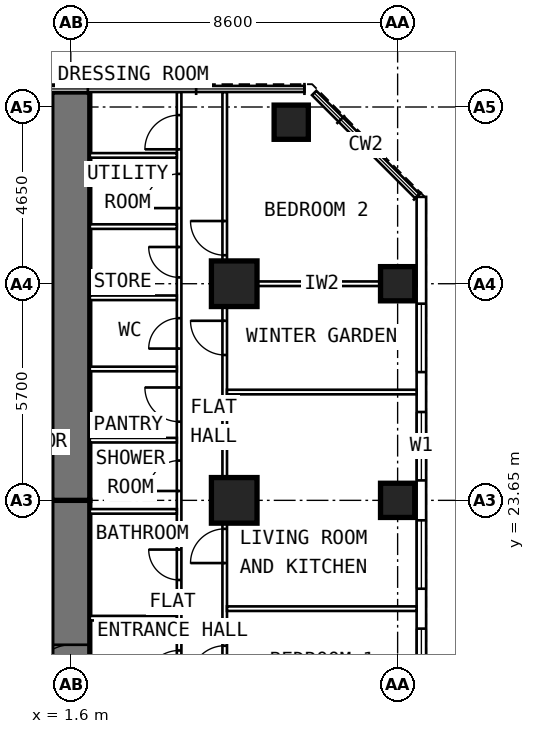
"""IFC4 building model, lengths in metres.
Left out: names, types, materials, properties, quantities, classifications, styles, units other than length and angle.
Written with IfcOpenShell. Run it as: python <this file> out.ifc"""

import sys

from ifc_helpers import new_model, si_unit, direction, frame, frame_2d, origin, origin_2d, place, context, subcontext, project, spatial, rectangle, extrude, element, fill, save


model = new_model("IFC4")
c1 = context("Model", 3, precision=1e-05, world=origin(), true_north=direction((0.0, 1.0)))
c2 = subcontext(c1, "Body", "Model", "MODEL_VIEW")
j1 = project(units=[si_unit("LENGTHUNIT", "METRE"), si_unit("PLANEANGLEUNIT", "RADIAN")], contexts=[c1])
p1 = place(None, origin())
s1 = spatial("IfcSite", under=j1, at=p1, CompositionType="ELEMENT")
p2 = place(p1, origin())
s2 = spatial("IfcBuilding", under=s1, at=p2, CompositionType="ELEMENT")
p3 = place(p2, frame((0.0, 0.0, 91.6)))
s3 = spatial("IfcBuildingStorey", under=s2, at=p3, CompositionType="ELEMENT", Elevation=91.6)
for number, where, z_axis, x_axis in (
    (1, (10.2, 23.65, 0.0), (0.0, 0.0, 1.0), (0.0, 1.0, 0.0)),
    (2, (10.2, 29.35, 0.0), (0.0, 0.0, 1.0), (0.0, 1.0, 0.0)),
    (3, (7.4, 33.6, 0.0), (0.0, 0.0, 1.0), (0.0, 1.0, 0.0)),
):
    element("IfcColumn", number, at=place(p3, frame(where, z_axis=z_axis, x_axis=x_axis)), inside=s3, PredefinedType="COLUMN", context=c2, shape_type="SweptSolid", body=[
        extrude(rectangle(XDim=0.9, YDim=0.9, at=origin_2d()), origin(), (0.0, 0.0, 1.0), 3.6),
    ])
for number, where, z_axis, x_axis in (
    (4, (5.9, 23.65, 0.0), (0.0, 0.0, 1.0), (0.0, 1.0, 0.0)),
    (5, (5.9, 29.35, 0.0), (0.0, 0.0, 1.0), (0.0, 1.0, 0.0)),
):
    element("IfcColumn", number, at=place(p3, frame(where, z_axis=z_axis, x_axis=x_axis)), inside=s3, PredefinedType="COLUMN", context=c2, shape_type="SweptSolid", body=[
        extrude(rectangle(XDim=1.2, YDim=1.2, at=origin_2d()), origin(), (0.0, 0.0, 1.0), 3.6),
    ])
p4 = place(p3, frame((1.6, 17.95, 0.0), z_axis=(0.0, 0.0, 1.0), x_axis=(0.0, 1.0, 0.0)))
e6 = element("IfcWall", 6, at=p4, inside=s3, PredefinedType="SHEAR", context=c2, shape_type="SweptSolid", body=[
    extrude(rectangle(XDim=5.7, YDim=1.0, at=frame_2d((2.85, 0.0))), origin(), (0.0, 0.0, 1.0), 3.6),
])
p5 = place(p4, frame((0.9, 0.0, 0.0)))
e7 = element("IfcOpeningElement", 7, at=p5, cuts=e6, PredefinedType="OPENING", context=c2, shape_type="SweptSolid", body=[
    extrude(rectangle(XDim=1.0, YDim=2.1, at=frame_2d((0.5, 1.05))), frame((0.0, 0.512, 0.0), z_axis=(0.0, -1.0, 0.0), x_axis=(1.0, 0.0, 0.0)), (0.0, 0.0, 1.0), 1.024),
])
p6 = place(p3, frame((1.6, 23.65, 0.0), z_axis=(0.0, 0.0, 1.0), x_axis=(0.0, 1.0, 0.0)))
e8 = element("IfcWall", 8, at=p6, inside=s3, PredefinedType="SHEAR", context=c2, shape_type="SweptSolid", body=[
    extrude(rectangle(XDim=10.745, YDim=1.0, at=frame_2d((5.373, 0.0))), origin(), (0.0, 0.0, 1.0), 3.6),
])
p7 = place(p3, frame((10.825, 6.409, 0.0), z_axis=(0.0, 0.0, 1.0), x_axis=(0.0, 1.0, 0.0)))
e9 = element("IfcWall", 9, at=p7, inside=s3, PredefinedType="SOLIDWALL", context=c2, shape_type="SweptSolid", body=[
    extrude(rectangle(XDim=25.226, YDim=0.25, at=frame_2d((12.613, 0.0))), origin(), (0.0, 0.0, 1.0), 3.35),
])
p8 = place(p7, frame((0.666, 0.0, 0.8)))
e10 = element("IfcOpeningElement", 10, at=p8, cuts=e9, PredefinedType="OPENING", context=c2, shape_type="SweptSolid", body=[
    extrude(rectangle(XDim=1.8, YDim=1.8, at=frame_2d((0.9, 0.9))), frame((0.0, 0.137, 0.0), z_axis=(0.0, -1.0, 0.0), x_axis=(1.0, 0.0, 0.0)), (0.0, 0.0, 1.0), 0.274),
])
p9 = place(p7, frame((3.516, 0.0, 0.8)))
e11 = element("IfcOpeningElement", 11, at=p9, cuts=e9, PredefinedType="OPENING", context=c2, shape_type="SweptSolid", body=[
    extrude(rectangle(XDim=1.8, YDim=1.8, at=frame_2d((0.9, 0.9))), frame((0.0, 0.137, 0.0), z_axis=(0.0, -1.0, 0.0), x_axis=(1.0, 0.0, 0.0)), (0.0, 0.0, 1.0), 0.274),
])
p10 = place(p7, frame((6.366, 0.0, 0.8)))
e12 = element("IfcOpeningElement", 12, at=p10, cuts=e9, PredefinedType="OPENING", context=c2, shape_type="SweptSolid", body=[
    extrude(rectangle(XDim=1.8, YDim=1.8, at=frame_2d((0.9, 0.9))), frame((0.0, 0.137, 0.0), z_axis=(0.0, -1.0, 0.0), x_axis=(1.0, 0.0, 0.0)), (0.0, 0.0, 1.0), 0.274),
])
p11 = place(p7, frame((9.216, 0.0, 0.8)))
e13 = element("IfcOpeningElement", 13, at=p11, cuts=e9, PredefinedType="OPENING", context=c2, shape_type="SweptSolid", body=[
    extrude(rectangle(XDim=1.8, YDim=1.8, at=frame_2d((0.9, 0.9))), frame((0.0, 0.137, 0.0), z_axis=(0.0, -1.0, 0.0), x_axis=(1.0, 0.0, 0.0)), (0.0, 0.0, 1.0), 0.274),
])
p12 = place(p7, frame((12.066, 0.0, 0.8)))
e14 = element("IfcOpeningElement", 14, at=p12, cuts=e9, PredefinedType="OPENING", context=c2, shape_type="SweptSolid", body=[
    extrude(rectangle(XDim=1.8, YDim=1.8, at=frame_2d((0.9, 0.9))), frame((0.0, 0.137, 0.0), z_axis=(0.0, -1.0, 0.0), x_axis=(1.0, 0.0, 0.0)), (0.0, 0.0, 1.0), 0.274),
])
p13 = place(p7, frame((14.916, 0.0, 0.8)))
e15 = element("IfcOpeningElement", 15, at=p13, cuts=e9, PredefinedType="OPENING", context=c2, shape_type="SweptSolid", body=[
    extrude(rectangle(XDim=1.8, YDim=1.8, at=frame_2d((0.9, 0.9))), frame((0.0, 0.137, 0.0), z_axis=(0.0, -1.0, 0.0), x_axis=(1.0, 0.0, 0.0)), (0.0, 0.0, 1.0), 0.274),
])
p14 = place(p7, frame((17.766, 0.0, 0.8)))
e16 = element("IfcOpeningElement", 16, at=p14, cuts=e9, PredefinedType="OPENING", context=c2, shape_type="SweptSolid", body=[
    extrude(rectangle(XDim=1.8, YDim=1.8, at=frame_2d((0.9, 0.9))), frame((0.0, 0.137, 0.0), z_axis=(0.0, -1.0, 0.0), x_axis=(1.0, 0.0, 0.0)), (0.0, 0.0, 1.0), 0.274),
])
p15 = place(p7, frame((20.616, 0.0, 0.8)))
e17 = element("IfcOpeningElement", 17, at=p15, cuts=e9, PredefinedType="OPENING", context=c2, shape_type="SweptSolid", body=[
    extrude(rectangle(XDim=1.8, YDim=1.8, at=frame_2d((0.9, 0.9))), frame((0.0, 0.137, 0.0), z_axis=(0.0, -1.0, 0.0), x_axis=(1.0, 0.0, 0.0)), (0.0, 0.0, 1.0), 0.274),
])
p16 = place(p3, frame((4.45, 18.05, 0.0), z_axis=(0.0, 0.0, 1.0), x_axis=(0.0, 1.0, 0.0)))
e18 = element("IfcWall", 18, at=p16, inside=s3, PredefinedType="PARTITIONING", context=c2, shape_type="SweptSolid", body=[
    extrude(rectangle(XDim=16.345, YDim=0.12, at=frame_2d((8.172, 0.0))), origin(), (0.0, 0.0, 1.0), 3.35),
])
p17 = place(p16, frame((0.75, 0.0, 0.0)))
e19 = element("IfcOpeningElement", 19, at=p17, cuts=e18, PredefinedType="OPENING", context=c2, shape_type="SweptSolid", body=[
    extrude(rectangle(XDim=0.9, YDim=2.1, at=frame_2d((0.45, 1.05))), frame((0.0, 0.072, 0.0), z_axis=(0.0, -1.0, 0.0), x_axis=(1.0, 0.0, 0.0)), (0.0, 0.0, 1.0), 0.144),
])
p18 = place(p16, frame((3.505, 0.0, 0.0)))
e20 = element("IfcOpeningElement", 20, at=p18, cuts=e18, PredefinedType="OPENING", context=c2, shape_type="SweptSolid", body=[
    extrude(rectangle(XDim=0.8, YDim=2.1, at=frame_2d((0.4, 1.05))), frame((0.0, 0.072, 0.0), z_axis=(0.0, -1.0, 0.0), x_axis=(1.0, 0.0, 0.0)), (0.0, 0.0, 1.0), 0.144),
])
p19 = place(p16, frame((5.847, 0.0, 0.0)))
e21 = element("IfcOpeningElement", 21, at=p19, cuts=e18, PredefinedType="OPENING", context=c2, shape_type="SweptSolid", body=[
    extrude(rectangle(XDim=0.8, YDim=2.1, at=frame_2d((0.4, 1.05))), frame((0.0, 0.072, 0.0), z_axis=(0.0, -1.0, 0.0), x_axis=(1.0, 0.0, 0.0)), (0.0, 0.0, 1.0), 0.144),
])
p20 = place(p16, frame((7.67, 0.0, 0.0)))
e22 = element("IfcOpeningElement", 22, at=p20, cuts=e18, PredefinedType="OPENING", context=c2, shape_type="SweptSolid", body=[
    extrude(rectangle(XDim=0.9, YDim=2.1, at=frame_2d((0.45, 1.05))), frame((0.0, 0.072, 0.0), z_axis=(0.0, -1.0, 0.0), x_axis=(1.0, 0.0, 0.0)), (0.0, 0.0, 1.0), 0.144),
])
p21 = place(p16, frame((9.593, 0.0, 0.0)))
e23 = element("IfcOpeningElement", 23, at=p21, cuts=e18, PredefinedType="OPENING", context=c2, shape_type="SweptSolid", body=[
    extrude(rectangle(XDim=0.8, YDim=2.1, at=frame_2d((0.4, 1.05))), frame((0.0, 0.072, 0.0), z_axis=(0.0, -1.0, 0.0), x_axis=(1.0, 0.0, 0.0)), (0.0, 0.0, 1.0), 0.144),
])
p22 = place(p16, frame((11.467, 0.0, 0.0)))
e24 = element("IfcOpeningElement", 24, at=p22, cuts=e18, PredefinedType="OPENING", context=c2, shape_type="SweptSolid", body=[
    extrude(rectangle(XDim=0.8, YDim=2.1, at=frame_2d((0.4, 1.05))), frame((0.0, 0.072, 0.0), z_axis=(0.0, -1.0, 0.0), x_axis=(1.0, 0.0, 0.0)), (0.0, 0.0, 1.0), 0.144),
])
p23 = place(p16, frame((13.29, 0.0, 0.0)))
e25 = element("IfcOpeningElement", 25, at=p23, cuts=e18, PredefinedType="OPENING", context=c2, shape_type="SweptSolid", body=[
    extrude(rectangle(XDim=0.9, YDim=2.1, at=frame_2d((0.45, 1.05))), frame((0.0, 0.072, 0.0), z_axis=(0.0, -1.0, 0.0), x_axis=(1.0, 0.0, 0.0)), (0.0, 0.0, 1.0), 0.144),
])
p24 = place(p16, frame((14.837, 0.0, 0.0)))
e26 = element("IfcOpeningElement", 26, at=p24, cuts=e18, PredefinedType="OPENING", context=c2, shape_type="SweptSolid", body=[
    extrude(rectangle(XDim=0.9, YDim=2.1, at=frame_2d((0.45, 1.05))), frame((0.0, 0.072, 0.0), z_axis=(0.0, -1.0, 0.0), x_axis=(1.0, 0.0, 0.0)), (0.0, 0.0, 1.0), 0.144),
])
p25 = place(p3, frame((5.65, 18.05, 0.0), z_axis=(0.0, 0.0, 1.0), x_axis=(0.0, 1.0, 0.0)))
e27 = element("IfcWall", 27, at=p25, inside=s3, PredefinedType="PARTITIONING", context=c2, shape_type="SweptSolid", body=[
    extrude(rectangle(XDim=16.345, YDim=0.12, at=frame_2d((8.172, 0.0))), origin(), (0.0, 0.0, 1.0), 3.35),
])
p26 = place(p25, frame((0.875, 0.0, 0.0)))
e28 = element("IfcOpeningElement", 28, at=p26, cuts=e27, PredefinedType="OPENING", context=c2, shape_type="SweptSolid", body=[
    extrude(rectangle(XDim=0.9, YDim=2.1, at=frame_2d((0.45, 1.05))), frame((0.0, 0.072, 0.0), z_axis=(0.0, -1.0, 0.0), x_axis=(1.0, 0.0, 0.0)), (0.0, 0.0, 1.0), 0.144),
])
p27 = place(p25, frame((3.95, 0.0, 0.0)))
e29 = element("IfcOpeningElement", 29, at=p27, cuts=e27, PredefinedType="OPENING", context=c2, shape_type="SweptSolid", body=[
    extrude(rectangle(XDim=0.9, YDim=2.1, at=frame_2d((0.45, 1.05))), frame((0.0, 0.072, 0.0), z_axis=(0.0, -1.0, 0.0), x_axis=(1.0, 0.0, 0.0)), (0.0, 0.0, 1.0), 0.144),
])
p28 = place(p25, frame((9.425, 0.0, 0.0)))
e30 = element("IfcOpeningElement", 30, at=p28, cuts=e27, PredefinedType="OPENING", context=c2, shape_type="SweptSolid", body=[
    extrude(rectangle(XDim=0.9, YDim=2.1, at=frame_2d((0.45, 1.05))), frame((0.0, 0.072, 0.0), z_axis=(0.0, -1.0, 0.0), x_axis=(1.0, 0.0, 0.0)), (0.0, 0.0, 1.0), 0.144),
])
p29 = place(p25, frame((12.05, 0.0, 0.0)))
e31 = element("IfcOpeningElement", 31, at=p29, cuts=e27, PredefinedType="OPENING", context=c2, shape_type="SweptSolid", body=[
    extrude(rectangle(XDim=0.9, YDim=2.1, at=frame_2d((0.45, 1.05))), frame((0.0, 0.072, 0.0), z_axis=(0.0, -1.0, 0.0), x_axis=(1.0, 0.0, 0.0)), (0.0, 0.0, 1.0), 0.144),
])
for number, where, z_axis, x_axis in (
    (32, (5.71, 20.8, 0.0), (0.0, 0.0, 1.0), (1.0, 0.0, 0.0)),
    (33, (5.71, 26.5, 0.0), (0.0, 0.0, 1.0), (1.0, 0.0, 0.0)),
):
    element("IfcWall", number, at=place(p3, frame(where, z_axis=z_axis, x_axis=x_axis)), inside=s3, PredefinedType="PARTITIONING", context=c2, shape_type="SweptSolid", body=[
        extrude(rectangle(XDim=4.99, YDim=0.12, at=frame_2d((2.495, 0.0))), origin(), (0.0, 0.0, 1.0), 3.35),
    ])
p30 = place(p3, frame((5.71, 29.35, 0.0), z_axis=(0.0, 0.0, 1.0), x_axis=(1.0, 0.0, 0.0)))
e34 = element("IfcWall", 34, at=p30, inside=s3, PredefinedType="PARTITIONING", context=c2, shape_type="SweptSolid", body=[
    extrude(rectangle(XDim=4.99, YDim=0.12, at=frame_2d((2.495, 0.0))), origin(), (0.0, 0.0, 1.0), 2.45),
])
p31 = place(p3, frame((2.1, 20.55, 0.0), z_axis=(0.0, 0.0, 1.0), x_axis=(1.0, 0.0, 0.0)))
e35 = element("IfcWall", 35, at=p31, inside=s3, PredefinedType="PARTITIONING", context=c2, shape_type="SweptSolid", body=[
    extrude(rectangle(XDim=2.29, YDim=0.12, at=frame_2d((1.145, 0.0))), origin(), (0.0, 0.0, 1.0), 3.35),
])
p32 = place(p3, frame((2.1, 23.36, 0.0), z_axis=(0.0, 0.0, 1.0), x_axis=(1.0, 0.0, 0.0)))
e36 = element("IfcWall", 36, at=p32, inside=s3, PredefinedType="PARTITIONING", context=c2, shape_type="SweptSolid", body=[
    extrude(rectangle(XDim=2.29, YDim=0.12, at=frame_2d((1.145, 0.0))), origin(), (0.0, 0.0, 1.0), 2.45),
])
for number, where, z_axis, x_axis in (
    (37, (2.1, 25.233, 0.0), (0.0, 0.0, 1.0), (1.0, 0.0, 0.0)),
    (38, (2.1, 27.107, 0.0), (0.0, 0.0, 1.0), (1.0, 0.0, 0.0)),
):
    element("IfcWall", number, at=place(p3, frame(where, z_axis=z_axis, x_axis=x_axis)), inside=s3, PredefinedType="PARTITIONING", context=c2, shape_type="SweptSolid", body=[
        extrude(rectangle(XDim=2.29, YDim=0.12, at=frame_2d((1.145, 0.0))), origin(), (0.0, 0.0, 1.0), 3.35),
    ])
p33 = place(p3, frame((2.1, 28.98, 0.0), z_axis=(0.0, 0.0, 1.0), x_axis=(1.0, 0.0, 0.0)))
e39 = element("IfcWall", 39, at=p33, inside=s3, PredefinedType="PARTITIONING", context=c2, shape_type="SweptSolid", body=[
    extrude(rectangle(XDim=2.29, YDim=0.12, at=frame_2d((1.145, 0.0))), origin(), (0.0, 0.0, 1.0), 2.45),
])
for number, where, z_axis, x_axis in (
    (40, (2.1, 30.853, 0.0), (0.0, 0.0, 1.0), (1.0, 0.0, 0.0)),
    (41, (2.1, 32.727, 0.0), (0.0, 0.0, 1.0), (1.0, 0.0, 0.0)),
):
    element("IfcWall", number, at=place(p3, frame(where, z_axis=z_axis, x_axis=x_axis)), inside=s3, PredefinedType="PARTITIONING", context=c2, shape_type="SweptSolid", body=[
        extrude(rectangle(XDim=2.29, YDim=0.12, at=frame_2d((1.145, 0.0))), origin(), (0.0, 0.0, 1.0), 3.35),
    ])
p34 = place(p12, origin())
e42 = element("IfcWindow", 42, at=p34, inside=s3, PartitioningType="SINGLE_PANEL", PredefinedType="WINDOW", context=c2, shape_type="SweptSolid", body=[
    extrude(rectangle(XDim=1.8, YDim=1.8, at=frame_2d((0.9, 0.9))), frame((0.0, 0.03, 0.0), z_axis=(0.0, -1.0, 0.0), x_axis=(1.0, 0.0, 0.0)), (0.0, 0.0, 1.0), 0.06),
])
fill(e14, e42)
p35 = place(p13, origin())
e43 = element("IfcWindow", 43, at=p35, inside=s3, PartitioningType="SINGLE_PANEL", PredefinedType="WINDOW", context=c2, shape_type="SweptSolid", body=[
    extrude(rectangle(XDim=1.8, YDim=1.8, at=frame_2d((0.9, 0.9))), frame((0.0, 0.03, 0.0), z_axis=(0.0, -1.0, 0.0), x_axis=(1.0, 0.0, 0.0)), (0.0, 0.0, 1.0), 0.06),
])
fill(e15, e43)
p36 = place(p14, origin())
e44 = element("IfcWindow", 44, at=p36, inside=s3, PartitioningType="SINGLE_PANEL", PredefinedType="WINDOW", context=c2, shape_type="SweptSolid", body=[
    extrude(rectangle(XDim=1.8, YDim=1.8, at=frame_2d((0.9, 0.9))), frame((0.0, 0.03, 0.0), z_axis=(0.0, -1.0, 0.0), x_axis=(1.0, 0.0, 0.0)), (0.0, 0.0, 1.0), 0.06),
])
fill(e16, e44)
p37 = place(p15, origin())
e45 = element("IfcWindow", 45, at=p37, inside=s3, PartitioningType="SINGLE_PANEL", PredefinedType="WINDOW", context=c2, shape_type="SweptSolid", body=[
    extrude(rectangle(XDim=1.8, YDim=1.8, at=frame_2d((0.9, 0.9))), frame((0.0, 0.03, 0.0), z_axis=(0.0, -1.0, 0.0), x_axis=(1.0, 0.0, 0.0)), (0.0, 0.0, 1.0), 0.06),
])
fill(e17, e45)
p38 = place(p5, origin())
e46 = element("IfcDoor", 46, at=p38, inside=s3, OperationType="SINGLE_SWING_LEFT", PredefinedType="DOOR", context=c2, shape_type="SweptSolid", body=[
    extrude(rectangle(XDim=1.0, YDim=2.1, at=frame_2d((0.5, 1.05))), frame((0.0, 0.25, 0.0), z_axis=(0.0, -1.0, 0.0), x_axis=(1.0, 0.0, 0.0)), (0.0, 0.0, 1.0), 0.5),
])
fill(e7, e46)
p39 = place(p26, origin())
e47 = element("IfcDoor", 47, at=p39, inside=s3, OperationType="SINGLE_SWING_LEFT", PredefinedType="DOOR", context=c2, shape_type="SweptSolid", body=[
    extrude(rectangle(XDim=0.9, YDim=2.1, at=frame_2d((0.45, 1.05))), frame((0.0, 0.025, 0.0), z_axis=(0.0, -1.0, 0.0), x_axis=(1.0, 0.0, 0.0)), (0.0, 0.0, 1.0), 0.05),
])
fill(e28, e47)
p40 = place(p27, origin())
e48 = element("IfcDoor", 48, at=p40, inside=s3, OperationType="SINGLE_SWING_LEFT", PredefinedType="DOOR", context=c2, shape_type="SweptSolid", body=[
    extrude(rectangle(XDim=0.9, YDim=2.1, at=frame_2d((0.45, 1.05))), frame((0.0, 0.025, 0.0), z_axis=(0.0, -1.0, 0.0), x_axis=(1.0, 0.0, 0.0)), (0.0, 0.0, 1.0), 0.05),
])
fill(e29, e48)
p41 = place(p28, origin())
e49 = element("IfcDoor", 49, at=p41, inside=s3, OperationType="SINGLE_SWING_RIGHT", PredefinedType="DOOR", context=c2, shape_type="SweptSolid", body=[
    extrude(rectangle(XDim=0.9, YDim=2.1, at=frame_2d((0.45, 1.05))), frame((0.0, 0.025, 0.0), z_axis=(0.0, -1.0, 0.0), x_axis=(1.0, 0.0, 0.0)), (0.0, 0.0, 1.0), 0.05),
])
fill(e30, e49)
p42 = place(p29, origin())
e50 = element("IfcDoor", 50, at=p42, inside=s3, OperationType="SINGLE_SWING_RIGHT", PredefinedType="DOOR", context=c2, shape_type="SweptSolid", body=[
    extrude(rectangle(XDim=0.9, YDim=2.1, at=frame_2d((0.45, 1.05))), frame((0.0, 0.025, 0.0), z_axis=(0.0, -1.0, 0.0), x_axis=(1.0, 0.0, 0.0)), (0.0, 0.0, 1.0), 0.05),
])
fill(e31, e50)
p43 = place(p17, origin())
e51 = element("IfcDoor", 51, at=p43, inside=s3, OperationType="SINGLE_SWING_LEFT", PredefinedType="DOOR", context=c2, shape_type="SweptSolid", body=[
    extrude(rectangle(XDim=0.9, YDim=2.1, at=frame_2d((0.45, 1.05))), frame((0.0, 0.025, 0.0), z_axis=(0.0, -1.0, 0.0), x_axis=(1.0, 0.0, 0.0)), (0.0, 0.0, 1.0), 0.05),
])
fill(e19, e51)
p44 = place(p18, origin())
e52 = element("IfcDoor", 52, at=p44, inside=s3, OperationType="SINGLE_SWING_RIGHT", PredefinedType="DOOR", context=c2, shape_type="SweptSolid", body=[
    extrude(rectangle(XDim=0.8, YDim=2.1, at=frame_2d((0.4, 1.05))), frame((0.0, 0.025, 0.0), z_axis=(0.0, -1.0, 0.0), x_axis=(1.0, 0.0, 0.0)), (0.0, 0.0, 1.0), 0.05),
])
fill(e20, e52)
p45 = place(p19, origin())
e53 = element("IfcDoor", 53, at=p45, inside=s3, OperationType="SINGLE_SWING_LEFT", PredefinedType="DOOR", context=c2, shape_type="SweptSolid", body=[
    extrude(rectangle(XDim=0.8, YDim=2.1, at=frame_2d((0.4, 1.05))), frame((0.0, 0.025, 0.0), z_axis=(0.0, -1.0, 0.0), x_axis=(1.0, 0.0, 0.0)), (0.0, 0.0, 1.0), 0.05),
])
fill(e21, e53)
p46 = place(p20, origin())
e54 = element("IfcDoor", 54, at=p46, inside=s3, OperationType="SINGLE_SWING_RIGHT", PredefinedType="DOOR", context=c2, shape_type="SweptSolid", body=[
    extrude(rectangle(XDim=0.9, YDim=2.1, at=frame_2d((0.45, 1.05))), frame((0.0, 0.025, 0.0), z_axis=(0.0, -1.0, 0.0), x_axis=(1.0, 0.0, 0.0)), (0.0, 0.0, 1.0), 0.05),
])
fill(e22, e54)
p47 = place(p21, origin())
e55 = element("IfcDoor", 55, at=p47, inside=s3, OperationType="SINGLE_SWING_LEFT", PredefinedType="DOOR", context=c2, shape_type="SweptSolid", body=[
    extrude(rectangle(XDim=0.8, YDim=2.1, at=frame_2d((0.4, 1.05))), frame((0.0, 0.025, 0.0), z_axis=(0.0, -1.0, 0.0), x_axis=(1.0, 0.0, 0.0)), (0.0, 0.0, 1.0), 0.05),
])
fill(e23, e55)
p48 = place(p22, origin())
e56 = element("IfcDoor", 56, at=p48, inside=s3, OperationType="SINGLE_SWING_RIGHT", PredefinedType="DOOR", context=c2, shape_type="SweptSolid", body=[
    extrude(rectangle(XDim=0.8, YDim=2.1, at=frame_2d((0.4, 1.05))), frame((0.0, 0.025, 0.0), z_axis=(0.0, -1.0, 0.0), x_axis=(1.0, 0.0, 0.0)), (0.0, 0.0, 1.0), 0.05),
])
fill(e24, e56)
p49 = place(p23, origin())
e57 = element("IfcDoor", 57, at=p49, inside=s3, OperationType="SINGLE_SWING_LEFT", PredefinedType="DOOR", context=c2, shape_type="SweptSolid", body=[
    extrude(rectangle(XDim=0.9, YDim=2.1, at=frame_2d((0.45, 1.05))), frame((0.0, 0.025, 0.0), z_axis=(0.0, -1.0, 0.0), x_axis=(1.0, 0.0, 0.0)), (0.0, 0.0, 1.0), 0.05),
])
fill(e25, e57)
p50 = place(p24, origin())
e58 = element("IfcDoor", 58, at=p50, inside=s3, OperationType="SINGLE_SWING_LEFT", PredefinedType="DOOR", context=c2, shape_type="SweptSolid", body=[
    extrude(rectangle(XDim=0.9, YDim=2.1, at=frame_2d((0.45, 1.05))), frame((0.0, 0.025, 0.0), z_axis=(0.0, -1.0, 0.0), x_axis=(1.0, 0.0, 0.0)), (0.0, 0.0, 1.0), 0.05),
])
fill(e26, e58)
save(model, sys.argv[1])
